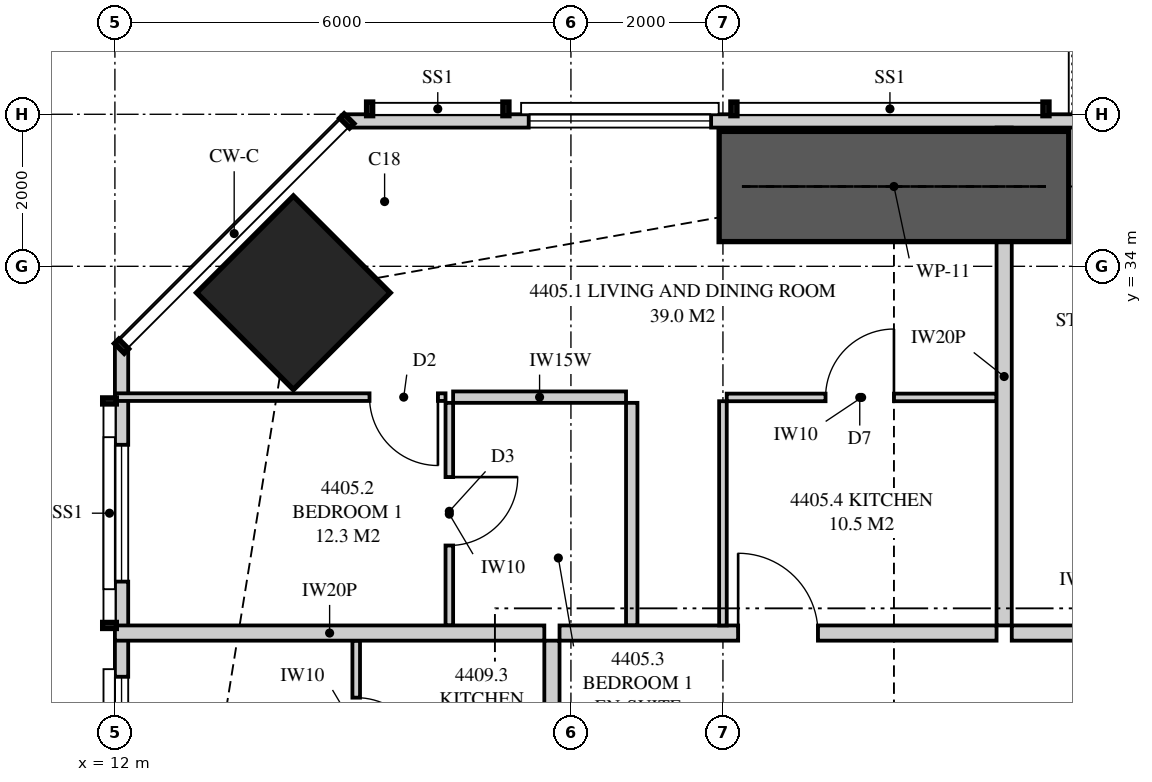
"""IFC4 building model, lengths in metres.
Left out: names, types, materials, properties, quantities, classifications, styles, units other than length and angle.
Written with IfcOpenShell. Run it as: python <this file> out.ifc"""

import sys

from ifc_helpers import new_model, si_unit, direction, frame, frame_2d, origin, origin_2d, place, context, subcontext, project, spatial, polyline, rectangle, outline, extrude, element, fill, save


model = new_model("IFC4")
c1 = context("Model", 3, precision=1e-05, world=origin(), true_north=direction((0.0, 1.0)))
c2 = subcontext(c1, "Body", "Model", "MODEL_VIEW")
j1 = project(units=[si_unit("LENGTHUNIT", "METRE"), si_unit("PLANEANGLEUNIT", "RADIAN")], contexts=[c1])
p1 = place(None, origin())
s1 = spatial("IfcSite", under=j1, at=p1, CompositionType="ELEMENT")
p2 = place(p1, origin())
s2 = spatial("IfcBuilding", under=s1, at=p2, CompositionType="ELEMENT")
p3 = place(p2, frame((0.0, 0.0, 164.4)))
s3 = spatial("IfcBuildingStorey", under=s2, at=p3, CompositionType="ELEMENT", Elevation=164.4)
p4 = place(p3, frame((14.348, 33.652, 0.0), z_axis=(0.0, 0.0, 1.0), x_axis=(0.707106781187, 0.707106781187, 0.0)))
e1 = element("IfcColumn", 1, at=p4, inside=s3, PredefinedType="COLUMN", context=c2, shape_type="SweptSolid", body=[
    extrude(rectangle(XDim=1.8, YDim=1.8, at=origin_2d()), origin(), (0.0, 0.0, 1.0), 3.35),
])
p5 = place(p3, frame((49.949, 35.913, 0.0), z_axis=(0.0, 0.0, 1.0), x_axis=(-1.0, 0.0, 0.0)))
e2 = element("IfcWall", 2, at=p5, inside=s3, PredefinedType="SOLIDWALL", context=c2, shape_type="SweptSolid", body=[
    extrude(outline(polyline([(0.0, 0.0), (34.897, 0.0), (34.897, 3.11), (27.91, 3.11), (27.91, 2.15), (27.836, 2.15), (27.836, 3.11), (27.699, 3.11), (27.699, 2.15), (7.199, 2.15), (7.199, 3.11), (7.062, 3.11), (7.062, 2.15), (6.987, 2.15), (6.987, 3.11), (0.0, 3.11), (0.0, 0.0)])), frame((0.0, 0.087, 0.0), z_axis=(0.0, -1.0, 0.0), x_axis=(1.0, 0.0, 0.0)), (0.0, 0.0, 1.0), 0.175),
])
p6 = place(p5, frame((2.149, 0.0, 0.4)))
e3 = element("IfcOpeningElement", 3, at=p6, cuts=e2, PredefinedType="OPENING", context=c2, shape_type="SweptSolid", body=[
    extrude(rectangle(XDim=1.8, YDim=1.7, at=frame_2d((0.9, 0.85))), frame((0.0, 0.097, 0.0), z_axis=(0.0, -1.0, 0.0), x_axis=(1.0, 0.0, 0.0)), (0.0, 0.0, 1.0), 0.195),
])
p7 = place(p5, frame((10.299, 0.0, 0.0)))
e4 = element("IfcOpeningElement", 4, at=p7, cuts=e2, PredefinedType="OPENING", context=c2, shape_type="SweptSolid", body=[
    extrude(rectangle(XDim=1.8, YDim=2.1, at=frame_2d((0.9, 1.05))), frame((0.0, 0.097, 0.0), z_axis=(0.0, -1.0, 0.0), x_axis=(1.0, 0.0, 0.0)), (0.0, 0.0, 1.0), 0.195),
])
p8 = place(p5, frame((13.231, 0.0, 0.4)))
e5 = element("IfcOpeningElement", 5, at=p8, cuts=e2, PredefinedType="OPENING", context=c2, shape_type="SweptSolid", body=[
    extrude(rectangle(XDim=1.8, YDim=1.7, at=frame_2d((0.9, 0.85))), frame((0.0, 0.097, 0.0), z_axis=(0.0, -1.0, 0.0), x_axis=(1.0, 0.0, 0.0)), (0.0, 0.0, 1.0), 0.195),
])
p9 = place(p5, frame((22.699, 0.0, 0.0)))
e6 = element("IfcOpeningElement", 6, at=p9, cuts=e2, PredefinedType="OPENING", context=c2, shape_type="SweptSolid", body=[
    extrude(rectangle(XDim=1.8, YDim=2.1, at=frame_2d((0.9, 1.05))), frame((0.0, 0.097, 0.0), z_axis=(0.0, -1.0, 0.0), x_axis=(1.0, 0.0, 0.0)), (0.0, 0.0, 1.0), 0.195),
])
p10 = place(p5, frame((19.853, 0.0, 0.4)))
e7 = element("IfcOpeningElement", 7, at=p10, cuts=e2, PredefinedType="OPENING", context=c2, shape_type="SweptSolid", body=[
    extrude(rectangle(XDim=2.4, YDim=1.7, at=frame_2d((1.2, 0.85))), frame((0.0, 0.097, 0.0), z_axis=(0.0, -1.0, 0.0), x_axis=(1.0, 0.0, 0.0)), (0.0, 0.0, 1.0), 0.195),
])
p11 = place(p5, frame((30.104, 0.0, 0.4)))
e8 = element("IfcOpeningElement", 8, at=p11, cuts=e2, PredefinedType="OPENING", context=c2, shape_type="SweptSolid", body=[
    extrude(rectangle(XDim=2.4, YDim=1.7, at=frame_2d((1.2, 0.85))), frame((0.0, 0.097, 0.0), z_axis=(0.0, -1.0, 0.0), x_axis=(1.0, 0.0, 0.0)), (0.0, 0.0, 1.0), 0.195),
])
p12 = place(p3, frame((12.087, 32.949, 0.0), z_axis=(0.0, 0.0, 1.0), x_axis=(0.0, -1.0, 0.0)))
e9 = element("IfcWall", 9, at=p12, inside=s3, PredefinedType="SOLIDWALL", context=c2, shape_type="SweptSolid", body=[
    extrude(outline(polyline([(0.0, 0.0), (29.897, 0.0), (29.897, 3.11), (20.191, 3.11), (20.191, 2.15), (20.051, 2.15), (20.051, 3.11), (19.949, 3.11), (19.949, 2.15), (7.949, 2.15), (7.949, 3.11), (7.823, 3.11), (7.823, 2.15), (7.73, 2.15), (7.73, 3.11), (0.0, 3.11), (0.0, 0.0)])), frame((0.0, 0.087, 0.0), z_axis=(0.0, -1.0, 0.0), x_axis=(1.0, 0.0, 0.0)), (0.0, 0.0, 1.0), 0.175),
])
p13 = place(p12, frame((1.297, 0.0, 0.4)))
e10 = element("IfcOpeningElement", 10, at=p13, cuts=e9, PredefinedType="OPENING", context=c2, shape_type="SweptSolid", body=[
    extrude(rectangle(XDim=1.8, YDim=1.7, at=frame_2d((0.9, 0.85))), frame((0.0, 0.097, 0.0), z_axis=(0.0, -1.0, 0.0), x_axis=(1.0, 0.0, 0.0)), (0.0, 0.0, 1.0), 0.195),
])
p14 = place(p12, frame((4.349, 0.0, 0.4)))
e11 = element("IfcOpeningElement", 11, at=p14, cuts=e9, PredefinedType="OPENING", context=c2, shape_type="SweptSolid", body=[
    extrude(rectangle(XDim=1.2, YDim=1.7, at=frame_2d((0.6, 0.85))), frame((0.0, 0.097, 0.0), z_axis=(0.0, -1.0, 0.0), x_axis=(1.0, 0.0, 0.0)), (0.0, 0.0, 1.0), 0.195),
])
p15 = place(p12, frame((11.024, 0.0, 0.4)))
e12 = element("IfcOpeningElement", 12, at=p15, cuts=e9, PredefinedType="OPENING", context=c2, shape_type="SweptSolid", body=[
    extrude(rectangle(XDim=1.8, YDim=1.7, at=frame_2d((0.9, 0.85))), frame((0.0, 0.097, 0.0), z_axis=(0.0, -1.0, 0.0), x_axis=(1.0, 0.0, 0.0)), (0.0, 0.0, 1.0), 0.195),
])
p16 = place(p12, frame((15.044, 0.0, 0.4)))
e13 = element("IfcOpeningElement", 13, at=p16, cuts=e9, PredefinedType="OPENING", context=c2, shape_type="SweptSolid", body=[
    extrude(rectangle(XDim=2.4, YDim=1.7, at=frame_2d((1.2, 0.85))), frame((0.0, 0.097, 0.0), z_axis=(0.0, -1.0, 0.0), x_axis=(1.0, 0.0, 0.0)), (0.0, 0.0, 1.0), 0.195),
])
p17 = place(p12, frame((22.624, 0.0, 0.0)))
e14 = element("IfcOpeningElement", 14, at=p17, cuts=e9, PredefinedType="OPENING", context=c2, shape_type="SweptSolid", body=[
    extrude(rectangle(XDim=1.8, YDim=2.1, at=frame_2d((0.9, 1.05))), frame((0.0, 0.097, 0.0), z_axis=(0.0, -1.0, 0.0), x_axis=(1.0, 0.0, 0.0)), (0.0, 0.0, 1.0), 0.195),
])
p18 = place(p12, frame((26.301, 0.0, 0.4)))
e15 = element("IfcOpeningElement", 15, at=p18, cuts=e9, PredefinedType="OPENING", context=c2, shape_type="SweptSolid", body=[
    extrude(rectangle(XDim=1.8, YDim=1.7, at=frame_2d((0.9, 0.85))), frame((0.0, 0.097, 0.0), z_axis=(0.0, -1.0, 0.0), x_axis=(1.0, 0.0, 0.0)), (0.0, 0.0, 1.0), 0.195),
])
p19 = place(p3, frame((23.7, 35.825, 0.0), z_axis=(0.0, 0.0, 1.0), x_axis=(0.0, -1.0, 0.0)))
e16 = element("IfcWall", 16, at=p19, inside=s3, PredefinedType="PARTITIONING", context=c2, shape_type="SweptSolid", body=[
    extrude(outline(polyline([(0.529, 2.15), (0.0, 2.15), (0.0, 0.0), (0.529, 0.0), (0.529, 0.332), (1.021, 0.332), (1.021, 0.0), (6.55, 0.0), (6.55, 3.11), (1.685, 3.11), (1.685, 2.15), (1.021, 2.15), (1.021, 1.818), (0.529, 1.818), (0.529, 2.15)])), frame((0.0, 0.1, 0.0), z_axis=(0.0, -1.0, 0.0), x_axis=(1.0, 0.0, 0.0)), (0.0, 0.0, 1.0), 0.2),
])
p20 = place(p3, frame((17.85, 29.175, 0.0), z_axis=(0.0, 0.0, 1.0), x_axis=(1.0, 0.0, 0.0)))
e17 = element("IfcWall", 17, at=p20, inside=s3, PredefinedType="PARTITIONING", context=c2, shape_type="SweptSolid", body=[
    extrude(outline(polyline([(0.0, 0.0), (5.75, 0.0), (5.75, 3.11), (4.737, 3.11), (4.737, 2.541), (4.062, 2.541), (4.062, 3.11), (0.0, 3.11), (0.0, 0.0)])), frame((0.0, 0.1, 0.0), z_axis=(0.0, -1.0, 0.0), x_axis=(1.0, 0.0, 0.0)), (0.0, 0.0, 1.0), 0.2),
])
p21 = place(p20, frame((2.35, 0.0, 0.0)))
e18 = element("IfcOpeningElement", 18, at=p21, cuts=e17, PredefinedType="OPENING", context=c2, shape_type="SweptSolid", body=[
    extrude(rectangle(XDim=1.05, YDim=2.2, at=frame_2d((0.525, 1.1))), frame((0.0, 0.11, 0.0), z_axis=(0.0, -1.0, 0.0), x_axis=(1.0, 0.0, 0.0)), (0.0, 0.0, 1.0), 0.22),
])
p22 = place(p3, frame((16.4, 32.204, 0.0), z_axis=(0.0, 0.0, 1.0), x_axis=(0.0, -1.0, 0.0)))
e19 = element("IfcWall", 19, at=p22, inside=s3, PredefinedType="PARTITIONING", context=c2, shape_type="SweptSolid", body=[
    extrude(rectangle(XDim=2.929, YDim=0.1, at=frame_2d((1.464, 0.0))), origin(), (0.0, 0.0, 1.0), 3.11),
])
p23 = place(p22, frame((0.977, 0.0, 0.0)))
e20 = element("IfcOpeningElement", 20, at=p23, cuts=e19, PredefinedType="OPENING", context=c2, shape_type="SweptSolid", body=[
    extrude(rectangle(XDim=0.9, YDim=2.1, at=frame_2d((0.45, 1.05))), frame((0.0, 0.06, 0.0), z_axis=(0.0, -1.0, 0.0), x_axis=(1.0, 0.0, 0.0)), (0.0, 0.0, 1.0), 0.12),
])
p24 = place(p3, frame((16.35, 32.279, 0.0), z_axis=(0.0, 0.0, 1.0), x_axis=(-1.0, 0.0, 0.0)))
e21 = element("IfcWall", 21, at=p24, inside=s3, PredefinedType="PARTITIONING", context=c2, shape_type="SweptSolid", body=[
    extrude(outline(polyline([(0.0, 0.0), (4.35, 0.0), (4.35, 3.11), (3.094, 3.11), (3.094, 2.15), (1.352, 2.15), (1.352, 3.11), (0.0, 3.11), (0.0, 0.0)])), frame((0.0, 0.05, 0.0), z_axis=(0.0, -1.0, 0.0), x_axis=(1.0, 0.0, 0.0)), (0.0, 0.0, 1.0), 0.1),
])
p25 = place(p24, frame((0.1, 0.0, 0.0)))
e22 = element("IfcOpeningElement", 22, at=p25, cuts=e21, PredefinedType="OPENING", context=c2, shape_type="SweptSolid", body=[
    extrude(rectangle(XDim=0.9, YDim=2.1, at=frame_2d((0.45, 1.05))), frame((0.0, 0.06, 0.0), z_axis=(0.0, -1.0, 0.0), x_axis=(1.0, 0.0, 0.0)), (0.0, 0.0, 1.0), 0.12),
])
p26 = place(p3, frame((18.725, 32.279, 0.0), z_axis=(0.0, 0.0, 1.0), x_axis=(-1.0, 0.0, 0.0)))
e23 = element("IfcWall", 23, at=p26, inside=s3, PredefinedType="PLUMBINGWALL", context=c2, shape_type="SweptSolid", body=[
    extrude(rectangle(XDim=2.275, YDim=0.15, at=frame_2d((1.138, 0.0))), origin(), (0.0, 0.0, 1.0), 3.11),
])
p27 = place(p3, frame((18.8, 32.204, 0.0), z_axis=(0.0, 0.0, 1.0), x_axis=(0.0, -1.0, 0.0)))
e24 = element("IfcWall", 24, at=p27, inside=s3, PredefinedType="PLUMBINGWALL", context=c2, shape_type="SweptSolid", body=[
    extrude(rectangle(XDim=2.929, YDim=0.15, at=frame_2d((1.464, 0.0))), origin(), (0.0, 0.0, 1.0), 3.11),
])
p28 = place(p3, frame((20.05, 32.275, 0.0), z_axis=(0.0, 0.0, 1.0), x_axis=(1.0, 0.0, 0.0)))
e25 = element("IfcWall", 25, at=p28, inside=s3, PredefinedType="PARTITIONING", context=c2, shape_type="SweptSolid", body=[
    extrude(outline(polyline([(0.0, 0.0), (3.55, 0.0), (3.55, 3.11), (2.487, 3.11), (2.487, 2.541), (1.913, 2.541), (1.913, 3.11), (0.0, 3.11), (0.0, 0.0)])), frame((0.0, 0.05, 0.0), z_axis=(0.0, -1.0, 0.0), x_axis=(1.0, 0.0, 0.0)), (0.0, 0.0, 1.0), 0.1),
])
p29 = place(p28, frame((1.3, 0.0, 0.0)))
e26 = element("IfcOpeningElement", 26, at=p29, cuts=e25, PredefinedType="OPENING", context=c2, shape_type="SweptSolid", body=[
    extrude(rectangle(XDim=0.9, YDim=2.1, at=frame_2d((0.45, 1.05))), frame((0.0, 0.06, 0.0), z_axis=(0.0, -1.0, 0.0), x_axis=(1.0, 0.0, 0.0)), (0.0, 0.0, 1.0), 0.12),
])
p30 = place(p3, frame((20.0, 32.225, 0.0), z_axis=(0.0, 0.0, 1.0), x_axis=(0.0, -1.0, 0.0)))
e27 = element("IfcWall", 27, at=p30, inside=s3, PredefinedType="PARTITIONING", context=c2, shape_type="SweptSolid", body=[
    extrude(rectangle(XDim=2.95, YDim=0.1, at=frame_2d((1.475, 0.0))), origin(), (0.0, 0.0, 1.0), 3.11),
])
p31 = place(p3, frame((23.8, 29.175, 0.0), z_axis=(0.0, 0.0, 1.0), x_axis=(1.0, 0.0, 0.0)))
e28 = element("IfcWall", 28, at=p31, inside=s3, PredefinedType="PARTITIONING", context=c2, shape_type="SweptSolid", body=[
    extrude(rectangle(XDim=1.9, YDim=0.2, at=frame_2d((0.95, 0.0))), origin(), (0.0, 0.0, 1.0), 3.11),
])
p32 = place(p3, frame((12.0, 29.175, 0.0), z_axis=(0.0, 0.0, 1.0), x_axis=(1.0, 0.0, 0.0)))
e29 = element("IfcWall", 29, at=p32, inside=s3, PredefinedType="PARTITIONING", context=c2, shape_type="SweptSolid", body=[
    extrude(outline(polyline([(0.0, 0.0), (5.65, 0.0), (5.65, 3.11), (2.547, 3.11), (2.547, 2.15), (0.703, 2.15), (0.703, 3.11), (0.0, 3.11), (0.0, 0.0)])), frame((0.0, 0.1, 0.0), z_axis=(0.0, -1.0, 0.0), x_axis=(1.0, 0.0, 0.0)), (0.0, 0.0, 1.0), 0.2),
])
p33 = place(p3, frame((17.75, 23.0, 0.0), z_axis=(0.0, 0.0, 1.0), x_axis=(0.0, 1.0, 0.0)))
e30 = element("IfcWall", 30, at=p33, inside=s3, PredefinedType="PARTITIONING", context=c2, shape_type="SweptSolid", body=[
    extrude(outline(polyline([(0.0, 0.0), (6.075, 0.0), (6.075, 3.11), (2.337, 3.11), (2.337, 2.541), (1.663, 2.541), (1.663, 3.11), (0.0, 3.11), (0.0, 0.0)])), frame((0.0, 0.1, 0.0), z_axis=(0.0, -1.0, 0.0), x_axis=(1.0, 0.0, 0.0)), (0.0, 0.0, 1.0), 0.2),
])
p34 = place(p33, frame((2.538, 0.0, 0.0)))
e31 = element("IfcOpeningElement", 31, at=p34, cuts=e30, PredefinedType="OPENING", context=c2, shape_type="SweptSolid", body=[
    extrude(rectangle(XDim=1.05, YDim=2.2, at=frame_2d((0.525, 1.1))), frame((0.0, 0.11, 0.0), z_axis=(0.0, -1.0, 0.0), x_axis=(1.0, 0.0, 0.0)), (0.0, 0.0, 1.0), 0.22),
])
p35 = place(p3, frame((15.175, 26.725, 0.0), z_axis=(0.0, 0.0, 1.0), x_axis=(0.0, 1.0, 0.0)))
e32 = element("IfcWall", 32, at=p35, inside=s3, PredefinedType="PARTITIONING", context=c2, shape_type="SweptSolid", body=[
    extrude(rectangle(XDim=2.35, YDim=0.1, at=frame_2d((1.175, 0.0))), origin(), (0.0, 0.0, 1.0), 3.11),
])
p36 = place(p35, frame((0.7, 0.0, 0.0)))
e33 = element("IfcOpeningElement", 33, at=p36, cuts=e32, PredefinedType="OPENING", context=c2, shape_type="SweptSolid", body=[
    extrude(rectangle(XDim=0.9, YDim=2.1, at=frame_2d((0.45, 1.05))), frame((0.0, 0.06, 0.0), z_axis=(0.0, -1.0, 0.0), x_axis=(1.0, 0.0, 0.0)), (0.0, 0.0, 1.0), 0.12),
])
p37 = place(p3, frame((19.95, 35.05, 0.0), z_axis=(0.0, 0.0, 1.0), x_axis=(1.0, 0.0, 0.0)))
e34 = element("IfcWall", 34, at=p37, inside=s3, PredefinedType="SHEAR", context=c2, shape_type="SweptSolid", body=[
    extrude(rectangle(XDim=4.6, YDim=1.45, at=frame_2d((2.3, 0.0))), origin(), (0.0, 0.0, 1.0), 3.35),
])
p38 = place(p11, origin())
e35 = element("IfcWindow", 35, at=p38, inside=s3, PartitioningType="SINGLE_PANEL", PredefinedType="WINDOW", context=c2, shape_type="SweptSolid", body=[
    extrude(rectangle(XDim=2.4, YDim=1.7, at=frame_2d((1.2, 0.85))), frame((0.0, 0.03, 0.0), z_axis=(0.0, -1.0, 0.0), x_axis=(1.0, 0.0, 0.0)), (0.0, 0.0, 1.0), 0.06),
])
fill(e8, e35)
p39 = place(p13, origin())
e36 = element("IfcWindow", 36, at=p39, inside=s3, PartitioningType="SINGLE_PANEL", PredefinedType="WINDOW", context=c2, shape_type="SweptSolid", body=[
    extrude(rectangle(XDim=1.8, YDim=1.7, at=frame_2d((0.9, 0.85))), frame((0.0, 0.03, 0.0), z_axis=(0.0, -1.0, 0.0), x_axis=(1.0, 0.0, 0.0)), (0.0, 0.0, 1.0), 0.06),
])
fill(e10, e36)
p40 = place(p14, origin())
e37 = element("IfcWindow", 37, at=p40, inside=s3, PartitioningType="SINGLE_PANEL", PredefinedType="WINDOW", context=c2, shape_type="SweptSolid", body=[
    extrude(rectangle(XDim=1.2, YDim=1.7, at=frame_2d((0.6, 0.85))), frame((0.0, 0.03, 0.0), z_axis=(0.0, -1.0, 0.0), x_axis=(1.0, 0.0, 0.0)), (0.0, 0.0, 1.0), 0.06),
])
fill(e11, e37)
p41 = place(p21, origin())
e38 = element("IfcDoor", 38, at=p41, inside=s3, OperationType="SINGLE_SWING_LEFT", PredefinedType="DOOR", context=c2, shape_type="SweptSolid", body=[
    extrude(rectangle(XDim=1.05, YDim=2.2, at=frame_2d((0.525, 1.1))), frame((0.0, 0.025, 0.0), z_axis=(0.0, -1.0, 0.0), x_axis=(1.0, 0.0, 0.0)), (0.0, 0.0, 1.0), 0.05),
])
fill(e18, e38)
p42 = place(p25, origin())
e39 = element("IfcDoor", 39, at=p42, inside=s3, OperationType="SINGLE_SWING_LEFT", PredefinedType="DOOR", context=c2, shape_type="SweptSolid", body=[
    extrude(rectangle(XDim=0.9, YDim=2.1, at=frame_2d((0.45, 1.05))), frame((0.0, 0.025, 0.0), z_axis=(0.0, -1.0, 0.0), x_axis=(1.0, 0.0, 0.0)), (0.0, 0.0, 1.0), 0.05),
])
fill(e22, e39)
p43 = place(p23, origin())
e40 = element("IfcDoor", 40, at=p43, inside=s3, OperationType="SINGLE_SWING_LEFT", PredefinedType="DOOR", context=c2, shape_type="SweptSolid", body=[
    extrude(rectangle(XDim=0.9, YDim=2.1, at=frame_2d((0.45, 1.05))), frame((0.0, 0.025, 0.0), z_axis=(0.0, -1.0, 0.0), x_axis=(1.0, 0.0, 0.0)), (0.0, 0.0, 1.0), 0.05),
])
fill(e20, e40)
p44 = place(p29, origin())
e41 = element("IfcDoor", 41, at=p44, inside=s3, OperationType="SINGLE_SWING_RIGHT", PredefinedType="DOOR", context=c2, shape_type="SweptSolid", body=[
    extrude(rectangle(XDim=0.9, YDim=2.1, at=frame_2d((0.45, 1.05))), frame((0.0, 0.025, 0.0), z_axis=(0.0, -1.0, 0.0), x_axis=(1.0, 0.0, 0.0)), (0.0, 0.0, 1.0), 0.05),
])
fill(e26, e41)
p45 = place(p36, frame((0.9, 0.0, 0.0), z_axis=(0.0, 0.0, 1.0), x_axis=(-1.0, 0.0, 0.0)))
e42 = element("IfcDoor", 42, at=p45, inside=s3, OperationType="SINGLE_SWING_RIGHT", PredefinedType="DOOR", context=c2, shape_type="SweptSolid", body=[
    extrude(rectangle(XDim=0.9, YDim=2.1, at=frame_2d((0.45, 1.05))), frame((0.0, 0.025, 0.0), z_axis=(0.0, -1.0, 0.0), x_axis=(1.0, 0.0, 0.0)), (0.0, 0.0, 1.0), 0.05),
])
fill(e33, e42)
save(model, sys.argv[1])
